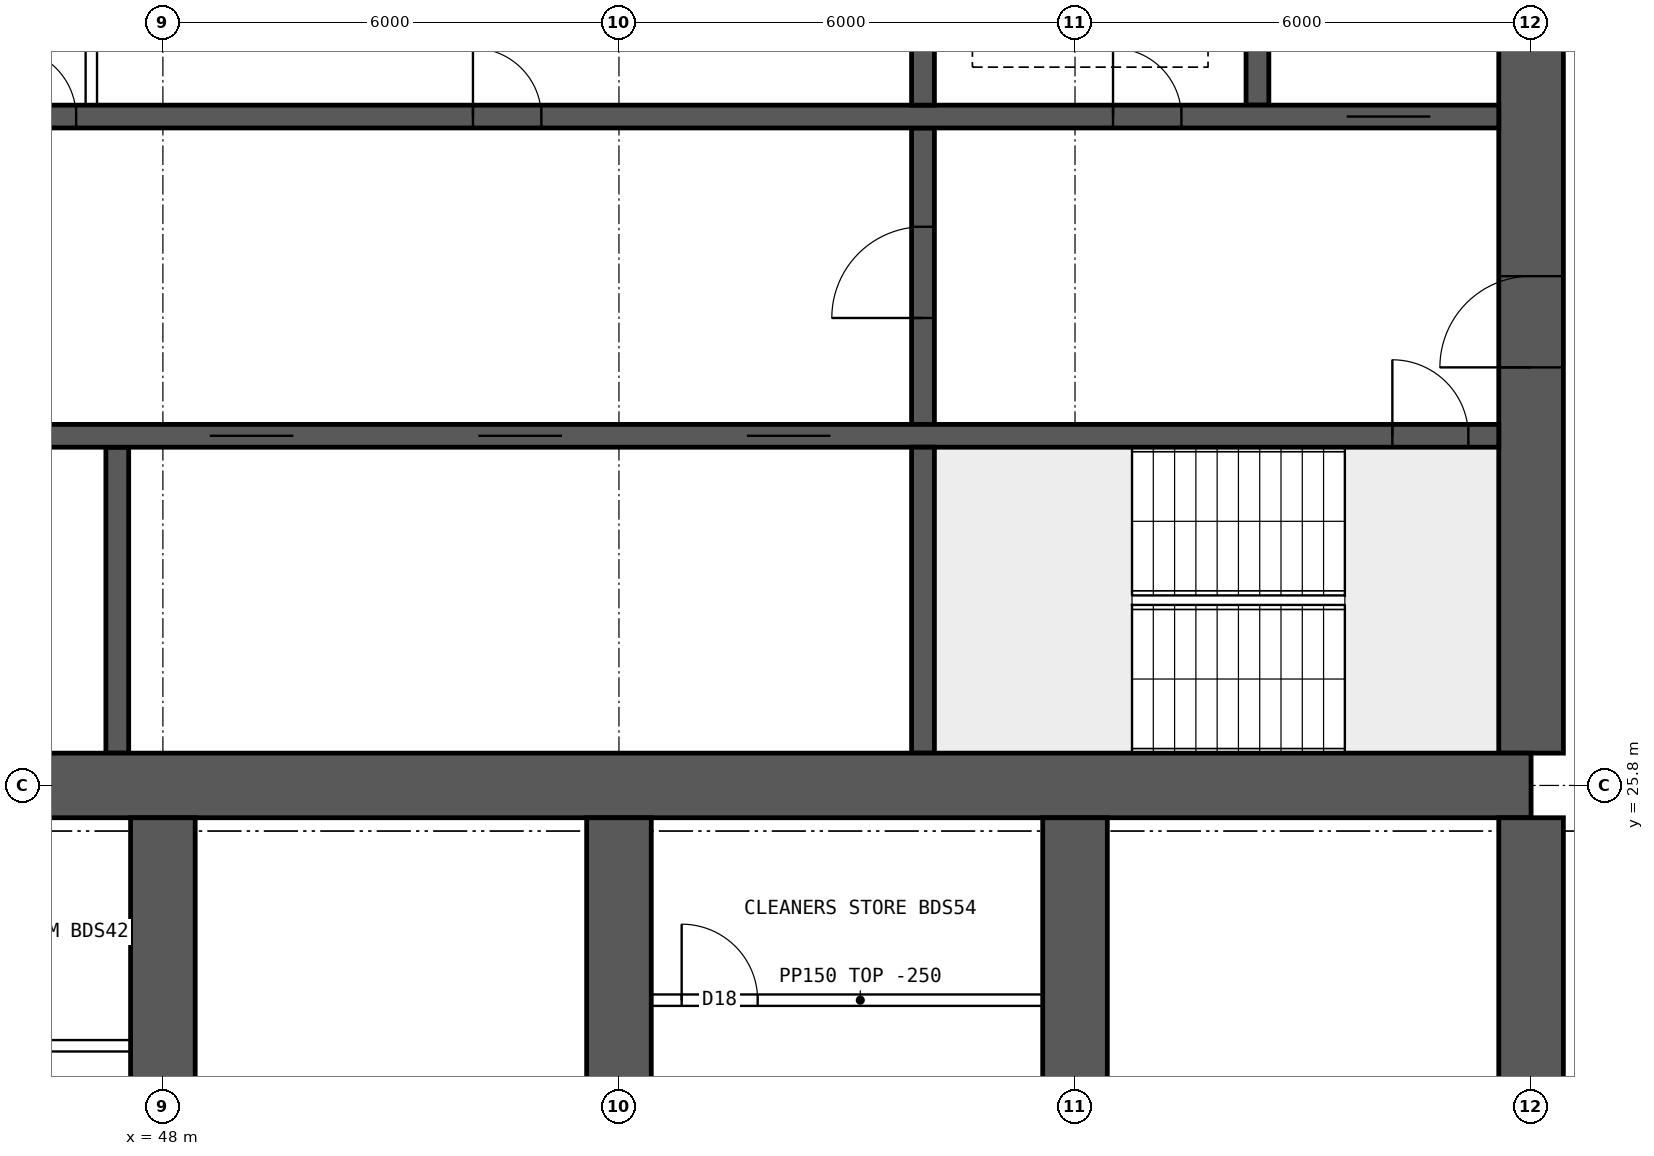
"""IFC4 building model, lengths in metres.
Left out: names, types, materials, properties, quantities, classifications, styles, units other than length and angle.
Written with IfcOpenShell. Run it as: python <this file> out.ifc"""

import sys

from ifc_helpers import new_model, si_unit, direction, frame, frame_2d, origin, place, context, subcontext, project, spatial, rectangle, extrude, element, fill, save


model = new_model("IFC4")
c1 = context("Model", 3, precision=1e-05, world=origin(), true_north=direction((0.0, 1.0)))
c2 = subcontext(c1, "Body", "Model", "MODEL_VIEW")
j1 = project(units=[si_unit("LENGTHUNIT", "METRE"), si_unit("PLANEANGLEUNIT", "RADIAN")], contexts=[c1])
p1 = place(None, origin())
s1 = spatial("IfcSite", under=j1, at=p1, CompositionType="ELEMENT")
p2 = place(p1, origin())
s2 = spatial("IfcBuilding", under=s1, at=p2, CompositionType="ELEMENT")
p3 = place(p2, frame((0.0, 0.0, 182.35)))
s3 = spatial("IfcBuildingStorey", under=s2, at=p3, CompositionType="ELEMENT", Elevation=182.35)
p4 = place(p3, frame((18.0, 25.8, 0.0), z_axis=(0.0, 0.0, 1.0), x_axis=(1.0, 0.0, 0.0)))
e1 = element("IfcWall", 1, at=p4, inside=s3, PredefinedType="SHEAR", context=c2, shape_type="SweptSolid", body=[
    extrude(rectangle(XDim=48.0, YDim=0.85, at=frame_2d((24.0, 0.0))), origin(), (0.0, 0.0, 1.0), 3.75),
])
p5 = place(p3, frame((66.0, 26.225, 0.0), z_axis=(0.0, 0.0, 1.0), x_axis=(0.0, 1.0, 0.0)))
e2 = element("IfcWall", 2, at=p5, inside=s3, PredefinedType="SHEAR", context=c2, shape_type="SweptSolid", body=[
    extrude(rectangle(XDim=11.55, YDim=0.85, at=frame_2d((5.775, 0.0))), origin(), (0.0, 0.0, 1.0), 3.75),
])
p6 = place(p5, frame((5.075, 0.0, 0.0)))
e3 = element("IfcOpeningElement", 3, at=p6, cuts=e2, PredefinedType="OPENING", context=c2, shape_type="SweptSolid", body=[
    extrude(rectangle(XDim=1.2, YDim=2.1, at=frame_2d((0.6, 1.05))), frame((0.0, 0.435, 0.0), z_axis=(0.0, -1.0, 0.0), x_axis=(1.0, 0.0, 0.0)), (0.0, 0.0, 1.0), 0.87),
])
p7 = place(p3, frame((18.425, 30.4, 0.0), z_axis=(0.0, 0.0, 1.0), x_axis=(1.0, 0.0, 0.0)))
e4 = element("IfcWall", 4, at=p7, inside=s3, PredefinedType="SHEAR", context=c2, shape_type="SweptSolid", body=[
    extrude(rectangle(XDim=47.15, YDim=0.3, at=frame_2d((23.575, 0.0))), origin(), (0.0, 0.0, 1.0), 3.75),
])
p8 = place(p7, frame((0.4, 0.0, 0.0)))
e5 = element("IfcOpeningElement", 5, at=p8, cuts=e4, PredefinedType="OPENING", context=c2, shape_type="SweptSolid", body=[
    extrude(rectangle(XDim=1.0, YDim=2.1, at=frame_2d((0.5, 1.05))), frame((0.0, 0.16, 0.0), z_axis=(0.0, -1.0, 0.0), x_axis=(1.0, 0.0, 0.0)), (0.0, 0.0, 1.0), 0.32),
])
p9 = place(p7, frame((45.75, 0.0, 0.0)))
e6 = element("IfcOpeningElement", 6, at=p9, cuts=e4, PredefinedType="OPENING", context=c2, shape_type="SweptSolid", body=[
    extrude(rectangle(XDim=1.0, YDim=2.1, at=frame_2d((0.5, 1.05))), frame((0.0, 0.16, 0.0), z_axis=(0.0, -1.0, 0.0), x_axis=(1.0, 0.0, 0.0)), (0.0, 0.0, 1.0), 0.32),
])
p10 = place(p7, frame((8.325, 0.0, 0.0)))
e7 = element("IfcOpeningElement", 7, at=p10, cuts=e4, PredefinedType="OPENING", context=c2, shape_type="SweptSolid", body=[
    extrude(rectangle(XDim=1.1, YDim=2.1, at=frame_2d((0.55, 1.05))), frame((0.0, 0.16, 0.0), z_axis=(0.0, -1.0, 0.0), x_axis=(1.0, 0.0, 0.0)), (0.0, 0.0, 1.0), 0.32),
])
p11 = place(p7, frame((10.925, 0.0, 0.0)))
e8 = element("IfcOpeningElement", 8, at=p11, cuts=e4, PredefinedType="OPENING", context=c2, shape_type="SweptSolid", body=[
    extrude(rectangle(XDim=1.1, YDim=2.1, at=frame_2d((0.55, 1.05))), frame((0.0, 0.16, 0.0), z_axis=(0.0, -1.0, 0.0), x_axis=(1.0, 0.0, 0.0)), (0.0, 0.0, 1.0), 0.32),
])
p12 = place(p7, frame((13.525, 0.0, 0.0)))
e9 = element("IfcOpeningElement", 9, at=p12, cuts=e4, PredefinedType="OPENING", context=c2, shape_type="SweptSolid", body=[
    extrude(rectangle(XDim=1.1, YDim=2.1, at=frame_2d((0.55, 1.05))), frame((0.0, 0.16, 0.0), z_axis=(0.0, -1.0, 0.0), x_axis=(1.0, 0.0, 0.0)), (0.0, 0.0, 1.0), 0.32),
])
p13 = place(p7, frame((16.125, 0.0, 0.0)))
e10 = element("IfcOpeningElement", 10, at=p13, cuts=e4, PredefinedType="OPENING", context=c2, shape_type="SweptSolid", body=[
    extrude(rectangle(XDim=1.1, YDim=2.1, at=frame_2d((0.55, 1.05))), frame((0.0, 0.16, 0.0), z_axis=(0.0, -1.0, 0.0), x_axis=(1.0, 0.0, 0.0)), (0.0, 0.0, 1.0), 0.32),
])
p14 = place(p7, frame((18.9, 0.0, 0.0)))
e11 = element("IfcOpeningElement", 11, at=p14, cuts=e4, PredefinedType="OPENING", context=c2, shape_type="SweptSolid", body=[
    extrude(rectangle(XDim=0.9, YDim=2.1, at=frame_2d((0.45, 1.05))), frame((0.0, 0.16, 0.0), z_axis=(0.0, -1.0, 0.0), x_axis=(1.0, 0.0, 0.0)), (0.0, 0.0, 1.0), 0.32),
])
p15 = place(p7, frame((30.192, 0.0, 0.0)))
e12 = element("IfcOpeningElement", 12, at=p15, cuts=e4, PredefinedType="OPENING", context=c2, shape_type="SweptSolid", body=[
    extrude(rectangle(XDim=1.1, YDim=2.1, at=frame_2d((0.55, 1.05))), frame((0.0, 0.16, 0.0), z_axis=(0.0, -1.0, 0.0), x_axis=(1.0, 0.0, 0.0)), (0.0, 0.0, 1.0), 0.32),
])
p16 = place(p7, frame((33.725, 0.0, 0.0)))
e13 = element("IfcOpeningElement", 13, at=p16, cuts=e4, PredefinedType="OPENING", context=c2, shape_type="SweptSolid", body=[
    extrude(rectangle(XDim=1.1, YDim=2.1, at=frame_2d((0.55, 1.05))), frame((0.0, 0.16, 0.0), z_axis=(0.0, -1.0, 0.0), x_axis=(1.0, 0.0, 0.0)), (0.0, 0.0, 1.0), 0.32),
])
p17 = place(p7, frame((37.258, 0.0, 0.0)))
e14 = element("IfcOpeningElement", 14, at=p17, cuts=e4, PredefinedType="OPENING", context=c2, shape_type="SweptSolid", body=[
    extrude(rectangle(XDim=1.1, YDim=2.1, at=frame_2d((0.55, 1.05))), frame((0.0, 0.16, 0.0), z_axis=(0.0, -1.0, 0.0), x_axis=(1.0, 0.0, 0.0)), (0.0, 0.0, 1.0), 0.32),
])
p18 = place(p3, frame((18.425, 34.6, 0.0), z_axis=(0.0, 0.0, 1.0), x_axis=(1.0, 0.0, 0.0)))
e15 = element("IfcWall", 15, at=p18, inside=s3, PredefinedType="SHEAR", context=c2, shape_type="SweptSolid", body=[
    extrude(rectangle(XDim=47.15, YDim=0.3, at=frame_2d((23.575, 0.0))), origin(), (0.0, 0.0, 1.0), 3.75),
])
p19 = place(p18, frame((0.9, 0.0, 0.0)))
e16 = element("IfcOpeningElement", 16, at=p19, cuts=e15, PredefinedType="OPENING", context=c2, shape_type="SweptSolid", body=[
    extrude(rectangle(XDim=1.1, YDim=2.1, at=frame_2d((0.55, 1.05))), frame((0.0, 0.16, 0.0), z_axis=(0.0, -1.0, 0.0), x_axis=(1.0, 0.0, 0.0)), (0.0, 0.0, 1.0), 0.32),
])
p20 = place(p18, frame((45.15, 0.0, 0.0)))
e17 = element("IfcOpeningElement", 17, at=p20, cuts=e15, PredefinedType="OPENING", context=c2, shape_type="SweptSolid", body=[
    extrude(rectangle(XDim=1.1, YDim=2.1, at=frame_2d((0.55, 1.05))), frame((0.0, 0.16, 0.0), z_axis=(0.0, -1.0, 0.0), x_axis=(1.0, 0.0, 0.0)), (0.0, 0.0, 1.0), 0.32),
])
p21 = place(p18, frame((4.175, 0.0, 0.0)))
e18 = element("IfcOpeningElement", 18, at=p21, cuts=e15, PredefinedType="OPENING", context=c2, shape_type="SweptSolid", body=[
    extrude(rectangle(XDim=0.9, YDim=2.1, at=frame_2d((0.45, 1.05))), frame((0.0, 0.16, 0.0), z_axis=(0.0, -1.0, 0.0), x_axis=(1.0, 0.0, 0.0)), (0.0, 0.0, 1.0), 0.32),
])
p22 = place(p18, frame((42.075, 0.0, 0.0)))
e19 = element("IfcOpeningElement", 19, at=p22, cuts=e15, PredefinedType="OPENING", context=c2, shape_type="SweptSolid", body=[
    extrude(rectangle(XDim=0.9, YDim=2.1, at=frame_2d((0.45, 1.05))), frame((0.0, 0.16, 0.0), z_axis=(0.0, -1.0, 0.0), x_axis=(1.0, 0.0, 0.0)), (0.0, 0.0, 1.0), 0.32),
])
p23 = place(p18, frame((8.95, 0.0, 0.0)))
e20 = element("IfcOpeningElement", 20, at=p23, cuts=e15, PredefinedType="OPENING", context=c2, shape_type="SweptSolid", body=[
    extrude(rectangle(XDim=0.9, YDim=2.1, at=frame_2d((0.45, 1.05))), frame((0.0, 0.16, 0.0), z_axis=(0.0, -1.0, 0.0), x_axis=(1.0, 0.0, 0.0)), (0.0, 0.0, 1.0), 0.32),
])
p24 = place(p18, frame((12.924, 0.0, 0.0)))
e21 = element("IfcOpeningElement", 21, at=p24, cuts=e15, PredefinedType="OPENING", context=c2, shape_type="SweptSolid", body=[
    extrude(rectangle(XDim=0.9, YDim=2.1, at=frame_2d((0.45, 1.05))), frame((0.0, 0.16, 0.0), z_axis=(0.0, -1.0, 0.0), x_axis=(1.0, 0.0, 0.0)), (0.0, 0.0, 1.0), 0.32),
])
p25 = place(p18, frame((16.571, 0.0, 0.0)))
e22 = element("IfcOpeningElement", 22, at=p25, cuts=e15, PredefinedType="OPENING", context=c2, shape_type="SweptSolid", body=[
    extrude(rectangle(XDim=0.9, YDim=2.1, at=frame_2d((0.45, 1.05))), frame((0.0, 0.16, 0.0), z_axis=(0.0, -1.0, 0.0), x_axis=(1.0, 0.0, 0.0)), (0.0, 0.0, 1.0), 0.32),
])
p26 = place(p18, frame((20.33, 0.0, 0.0)))
e23 = element("IfcOpeningElement", 23, at=p26, cuts=e15, PredefinedType="OPENING", context=c2, shape_type="SweptSolid", body=[
    extrude(rectangle(XDim=0.9, YDim=2.1, at=frame_2d((0.45, 1.05))), frame((0.0, 0.16, 0.0), z_axis=(0.0, -1.0, 0.0), x_axis=(1.0, 0.0, 0.0)), (0.0, 0.0, 1.0), 0.32),
])
p27 = place(p18, frame((24.736, 0.0, 0.0)))
e24 = element("IfcOpeningElement", 24, at=p27, cuts=e15, PredefinedType="OPENING", context=c2, shape_type="SweptSolid", body=[
    extrude(rectangle(XDim=0.9, YDim=2.1, at=frame_2d((0.45, 1.05))), frame((0.0, 0.16, 0.0), z_axis=(0.0, -1.0, 0.0), x_axis=(1.0, 0.0, 0.0)), (0.0, 0.0, 1.0), 0.32),
])
p28 = place(p18, frame((27.533, 0.0, 0.0)))
e25 = element("IfcOpeningElement", 25, at=p28, cuts=e15, PredefinedType="OPENING", context=c2, shape_type="SweptSolid", body=[
    extrude(rectangle(XDim=0.9, YDim=2.1, at=frame_2d((0.45, 1.05))), frame((0.0, 0.16, 0.0), z_axis=(0.0, -1.0, 0.0), x_axis=(1.0, 0.0, 0.0)), (0.0, 0.0, 1.0), 0.32),
])
p29 = place(p18, frame((33.654, 0.0, 0.0)))
e26 = element("IfcOpeningElement", 26, at=p29, cuts=e15, PredefinedType="OPENING", context=c2, shape_type="SweptSolid", body=[
    extrude(rectangle(XDim=0.9, YDim=2.1, at=frame_2d((0.45, 1.05))), frame((0.0, 0.16, 0.0), z_axis=(0.0, -1.0, 0.0), x_axis=(1.0, 0.0, 0.0)), (0.0, 0.0, 1.0), 0.32),
])
p30 = place(p3, frame((58.0, 26.225, 0.0), z_axis=(0.0, 0.0, 1.0), x_axis=(0.0, 1.0, 0.0)))
e27 = element("IfcWall", 27, at=p30, inside=s3, PredefinedType="SHEAR", context=c2, shape_type="SweptSolid", body=[
    extrude(rectangle(XDim=4.025, YDim=0.3, at=frame_2d((2.012, 0.0))), origin(), (0.0, 0.0, 1.0), 3.75),
])
p31 = place(p3, frame((58.0, 30.55, 0.0), z_axis=(0.0, 0.0, 1.0), x_axis=(0.0, 1.0, 0.0)))
e28 = element("IfcWall", 28, at=p31, inside=s3, PredefinedType="SHEAR", context=c2, shape_type="SweptSolid", body=[
    extrude(rectangle(XDim=3.9, YDim=0.3, at=frame_2d((1.95, 0.0))), origin(), (0.0, 0.0, 1.0), 3.75),
])
p32 = place(p31, frame((1.4, 0.0, 0.0)))
e29 = element("IfcOpeningElement", 29, at=p32, cuts=e28, PredefinedType="OPENING", context=c2, shape_type="SweptSolid", body=[
    extrude(rectangle(XDim=1.2, YDim=2.1, at=frame_2d((0.6, 1.05))), frame((0.0, 0.16, 0.0), z_axis=(0.0, -1.0, 0.0), x_axis=(1.0, 0.0, 0.0)), (0.0, 0.0, 1.0), 0.32),
])
for number, where, z_axis, x_axis in (
    (30, (62.4, 34.75, 0.0), (0.0, 0.0, 1.0), (0.0, 1.0, 0.0)),
    (31, (58.0, 34.75, 0.0), (0.0, 0.0, 1.0), (0.0, 1.0, 0.0)),
):
    element("IfcWall", number, at=place(p3, frame(where, z_axis=z_axis, x_axis=x_axis)), inside=s3, PredefinedType="SHEAR", context=c2, shape_type="SweptSolid", body=[
        extrude(rectangle(XDim=3.025, YDim=0.3, at=frame_2d((1.512, 0.0))), origin(), (0.0, 0.0, 1.0), 3.75),
    ])
p33 = place(p3, frame((47.4, 26.225, 0.0), z_axis=(0.0, 0.0, 1.0), x_axis=(0.0, 1.0, 0.0)))
e32 = element("IfcWall", 32, at=p33, inside=s3, PredefinedType="SHEAR", context=c2, shape_type="SweptSolid", body=[
    extrude(rectangle(XDim=4.025, YDim=0.3, at=frame_2d((2.012, 0.0))), origin(), (0.0, 0.0, 1.0), 3.75),
])
for number, where, z_axis, x_axis in (
    (33, (48.0, 17.2, 0.0), (0.0, 0.0, 1.0), (0.0, 1.0, 0.0)),
    (34, (54.0, 17.2, 0.0), (0.0, 0.0, 1.0), (0.0, 1.0, 0.0)),
    (35, (60.0, 17.2, 0.0), (0.0, 0.0, 1.0), (0.0, 1.0, 0.0)),
    (36, (66.0, 17.2, 0.0), (0.0, 0.0, 1.0), (0.0, 1.0, 0.0)),
):
    element("IfcWall", number, at=place(p3, frame(where, z_axis=z_axis, x_axis=x_axis)), inside=s3, PredefinedType="SHEAR", context=c2, shape_type="SweptSolid", body=[
        extrude(rectangle(XDim=8.175, YDim=0.85, at=frame_2d((4.087, 0.0))), origin(), (0.0, 0.0, 1.0), 3.75),
    ])
p34 = place(p3, frame((47.058, 34.75, 0.0), z_axis=(0.0, 0.0, 1.0), x_axis=(0.0, 1.0, 0.0)))
e37 = element("IfcWall", 37, at=p34, inside=s3, PredefinedType="SOLIDWALL", context=c2, shape_type="SweptSolid", body=[
    extrude(rectangle(XDim=3.025, YDim=0.15, at=frame_2d((1.512, 0.0))), origin(), (0.0, 0.0, 1.0), 3.5),
])
p35 = place(p3, frame((42.425, 22.375, 0.0), z_axis=(0.0, 0.0, 1.0), x_axis=(1.0, 0.0, 0.0)))
e38 = element("IfcWall", 38, at=p35, inside=s3, PredefinedType="PARTITIONING", context=c2, shape_type="SweptSolid", body=[
    extrude(rectangle(XDim=5.5, YDim=0.15, at=frame_2d((2.75, 0.0))), origin(), (0.0, 0.0, 1.0), 3.5),
])
p36 = place(p35, frame((0.4, 0.0, 0.0)))
e39 = element("IfcOpeningElement", 39, at=p36, cuts=e38, PredefinedType="OPENING", context=c2, shape_type="SweptSolid", body=[
    extrude(rectangle(XDim=1.0, YDim=2.1, at=frame_2d((0.5, 1.05))), frame((0.0, 0.085, 0.0), z_axis=(0.0, -1.0, 0.0), x_axis=(1.0, 0.0, 0.0)), (0.0, 0.0, 1.0), 0.17),
])
p37 = place(p3, frame((54.425, 22.975, 0.0), z_axis=(0.0, 0.0, 1.0), x_axis=(1.0, 0.0, 0.0)))
e40 = element("IfcWall", 40, at=p37, inside=s3, PredefinedType="PARTITIONING", context=c2, shape_type="SweptSolid", body=[
    extrude(rectangle(XDim=5.5, YDim=0.15, at=frame_2d((2.75, 0.0))), origin(), (0.0, 0.0, 1.0), 3.5),
])
p38 = place(p37, frame((0.4, 0.0, 0.0)))
e41 = element("IfcOpeningElement", 41, at=p38, cuts=e40, PredefinedType="OPENING", context=c2, shape_type="SweptSolid", body=[
    extrude(rectangle(XDim=1.0, YDim=2.1, at=frame_2d((0.5, 1.05))), frame((0.0, 0.085, 0.0), z_axis=(0.0, -1.0, 0.0), x_axis=(1.0, 0.0, 0.0)), (0.0, 0.0, 1.0), 0.17),
])
p39 = place(p6, origin())
e42 = element("IfcDoor", 42, at=p39, inside=s3, OperationType="SINGLE_SWING_LEFT", PredefinedType="DOOR", context=c2, shape_type="SweptSolid", body=[
    extrude(rectangle(XDim=1.2, YDim=2.1, at=frame_2d((0.6, 1.05))), frame((0.0, 0.025, 0.0), z_axis=(0.0, -1.0, 0.0), x_axis=(1.0, 0.0, 0.0)), (0.0, 0.0, 1.0), 0.05),
])
fill(e3, e42)
p40 = place(p9, origin())
e43 = element("IfcDoor", 43, at=p40, inside=s3, OperationType="SINGLE_SWING_LEFT", PredefinedType="DOOR", context=c2, shape_type="SweptSolid", body=[
    extrude(rectangle(XDim=1.0, YDim=2.1, at=frame_2d((0.5, 1.05))), frame((0.0, 0.025, 0.0), z_axis=(0.0, -1.0, 0.0), x_axis=(1.0, 0.0, 0.0)), (0.0, 0.0, 1.0), 0.05),
])
fill(e6, e43)
p41 = place(p20, origin())
e44 = element("IfcDoor", 44, at=p41, inside=s3, OperationType="DOUBLE_DOOR_SLIDING", PredefinedType="DOOR", context=c2, shape_type="SweptSolid", body=[
    extrude(rectangle(XDim=1.1, YDim=2.1, at=frame_2d((0.55, 1.05))), frame((0.0, 0.025, 0.0), z_axis=(0.0, -1.0, 0.0), x_axis=(1.0, 0.0, 0.0)), (0.0, 0.0, 1.0), 0.05),
])
fill(e17, e44)
p42 = place(p22, origin())
e45 = element("IfcDoor", 45, at=p42, inside=s3, OperationType="SINGLE_SWING_LEFT", PredefinedType="DOOR", context=c2, shape_type="SweptSolid", body=[
    extrude(rectangle(XDim=0.9, YDim=2.1, at=frame_2d((0.45, 1.05))), frame((0.0, 0.025, 0.0), z_axis=(0.0, -1.0, 0.0), x_axis=(1.0, 0.0, 0.0)), (0.0, 0.0, 1.0), 0.05),
])
fill(e19, e45)
p43 = place(p32, origin())
e46 = element("IfcDoor", 46, at=p43, inside=s3, OperationType="SINGLE_SWING_LEFT", PredefinedType="DOOR", context=c2, shape_type="SweptSolid", body=[
    extrude(rectangle(XDim=1.2, YDim=2.1, at=frame_2d((0.6, 1.05))), frame((0.0, 0.025, 0.0), z_axis=(0.0, -1.0, 0.0), x_axis=(1.0, 0.0, 0.0)), (0.0, 0.0, 1.0), 0.05),
])
fill(e29, e46)
p44 = place(p28, origin())
e47 = element("IfcDoor", 47, at=p44, inside=s3, OperationType="SINGLE_SWING_LEFT", PredefinedType="DOOR", context=c2, shape_type="SweptSolid", body=[
    extrude(rectangle(XDim=0.9, YDim=2.1, at=frame_2d((0.45, 1.05))), frame((0.0, 0.025, 0.0), z_axis=(0.0, -1.0, 0.0), x_axis=(1.0, 0.0, 0.0)), (0.0, 0.0, 1.0), 0.05),
])
fill(e25, e47)
p45 = place(p29, origin())
e48 = element("IfcDoor", 48, at=p45, inside=s3, OperationType="SINGLE_SWING_LEFT", PredefinedType="DOOR", context=c2, shape_type="SweptSolid", body=[
    extrude(rectangle(XDim=0.9, YDim=2.1, at=frame_2d((0.45, 1.05))), frame((0.0, 0.025, 0.0), z_axis=(0.0, -1.0, 0.0), x_axis=(1.0, 0.0, 0.0)), (0.0, 0.0, 1.0), 0.05),
])
fill(e26, e48)
p46 = place(p15, origin())
e49 = element("IfcDoor", 49, at=p46, inside=s3, OperationType="DOUBLE_DOOR_SLIDING", PredefinedType="DOOR", context=c2, shape_type="SweptSolid", body=[
    extrude(rectangle(XDim=1.1, YDim=2.1, at=frame_2d((0.55, 1.05))), frame((0.0, 0.025, 0.0), z_axis=(0.0, -1.0, 0.0), x_axis=(1.0, 0.0, 0.0)), (0.0, 0.0, 1.0), 0.05),
])
fill(e12, e49)
p47 = place(p16, origin())
e50 = element("IfcDoor", 50, at=p47, inside=s3, OperationType="DOUBLE_DOOR_SLIDING", PredefinedType="DOOR", context=c2, shape_type="SweptSolid", body=[
    extrude(rectangle(XDim=1.1, YDim=2.1, at=frame_2d((0.55, 1.05))), frame((0.0, 0.025, 0.0), z_axis=(0.0, -1.0, 0.0), x_axis=(1.0, 0.0, 0.0)), (0.0, 0.0, 1.0), 0.05),
])
fill(e13, e50)
p48 = place(p17, origin())
e51 = element("IfcDoor", 51, at=p48, inside=s3, OperationType="DOUBLE_DOOR_SLIDING", PredefinedType="DOOR", context=c2, shape_type="SweptSolid", body=[
    extrude(rectangle(XDim=1.1, YDim=2.1, at=frame_2d((0.55, 1.05))), frame((0.0, 0.025, 0.0), z_axis=(0.0, -1.0, 0.0), x_axis=(1.0, 0.0, 0.0)), (0.0, 0.0, 1.0), 0.05),
])
fill(e14, e51)
p49 = place(p38, origin())
e52 = element("IfcDoor", 52, at=p49, inside=s3, OperationType="SINGLE_SWING_LEFT", PredefinedType="DOOR", context=c2, shape_type="SweptSolid", body=[
    extrude(rectangle(XDim=1.0, YDim=2.1, at=frame_2d((0.5, 1.05))), frame((0.0, 0.025, 0.0), z_axis=(0.0, -1.0, 0.0), x_axis=(1.0, 0.0, 0.0)), (0.0, 0.0, 1.0), 0.05),
])
fill(e41, e52)
save(model, sys.argv[1])
